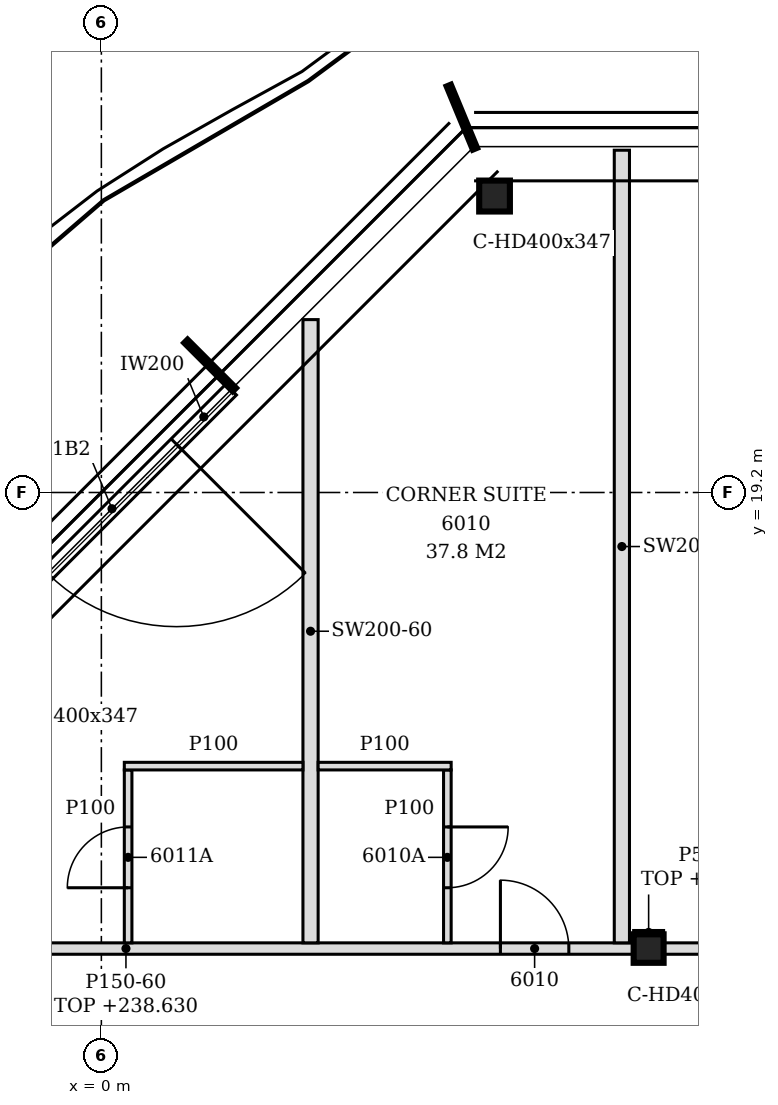
"""IFC4 building model, lengths in metres.
Left out: names, types, materials, properties, quantities, classifications, styles, units other than length and angle.
Written with IfcOpenShell. Run it as: python <this file> out.ifc"""

import sys

from ifc_helpers import new_model, si_unit, direction, frame, frame_2d, origin, origin_2d, place, context, subcontext, project, spatial, polyline, rectangle, i_section, outline, extrude, element, fill, save


model = new_model("IFC4")
c1 = context("Model", 3, precision=1e-05, world=origin(), true_north=direction((0.0, 1.0)))
c2 = subcontext(c1, "Body", "Model", "MODEL_VIEW")
j1 = project(units=[si_unit("LENGTHUNIT", "METRE"), si_unit("PLANEANGLEUNIT", "RADIAN")], contexts=[c1])
p1 = place(None, origin())
s1 = spatial("IfcSite", under=j1, at=p1, CompositionType="ELEMENT")
p2 = place(p1, origin())
s2 = spatial("IfcBuilding", under=s1, at=p2, CompositionType="ELEMENT")
p3 = place(p2, frame((0.0, 0.0, 235.8)))
s3 = spatial("IfcBuildingStorey", under=s2, at=p3, CompositionType="ELEMENT", Elevation=235.8)
p4 = place(p3, frame((5.173, 23.1, -0.15), z_axis=(0.0, 0.0, 1.0), x_axis=(1.0, 0.0, 0.0)))
e1 = element("IfcColumn", 1, at=p4, inside=s3, PredefinedType="COLUMN", context=c2, shape_type="SweptSolid", body=[
    extrude(i_section(OverallWidth=0.404, OverallDepth=0.407, WebThickness=0.027, FlangeThickness=0.044, FilletRadius=0.015, at=origin_2d()), origin(), (0.0, 0.0, 1.0), 3.6),
])
p5 = place(p3, frame((7.2, 13.2, -0.15), z_axis=(0.0, 0.0, 1.0), x_axis=(1.0, 0.0, 0.0)))
e2 = element("IfcColumn", 2, at=p5, inside=s3, PredefinedType="COLUMN", context=c2, shape_type="SweptSolid", body=[
    extrude(i_section(OverallWidth=0.394, OverallDepth=0.375, WebThickness=0.017, FlangeThickness=0.028, FilletRadius=0.015, at=origin_2d()), origin(), (0.0, 0.0, 1.0), 3.6),
])
p6 = place(p3, frame((1.707, 20.553, 0.0), z_axis=(0.0, 0.0, 1.0), x_axis=(-0.707106781187, -0.707106781187, 0.0)))
e3 = element("IfcWall", 3, at=p6, inside=s3, PredefinedType="NOTDEFINED", context=c2, shape_type="SweptSolid", body=[
    extrude(rectangle(XDim=4.431, YDim=0.2, at=frame_2d((2.216, 0.0))), origin(), (0.0, 0.0, 1.0), 3.45),
])
p7 = place(p6, frame((1.016, 0.0, 0.0)))
e4 = element("IfcOpeningElement", 4, at=p7, cuts=e3, PredefinedType="OPENING", context=c2, shape_type="SweptSolid", body=[
    extrude(rectangle(XDim=2.4, YDim=2.4, at=frame_2d((1.2, 1.2))), frame((0.0, 0.11, 0.0), z_axis=(0.0, -1.0, 0.0), x_axis=(1.0, 0.0, 0.0)), (0.0, 0.0, 1.0), 0.22),
])
p8 = place(p3, frame((-4.603, 13.2, 0.0), z_axis=(0.0, 0.0, 1.0), x_axis=(1.0, 0.0, 0.0)))
e5 = element("IfcWall", 5, at=p8, inside=s3, PredefinedType="PARTITIONING", context=c2, shape_type="SweptSolid", body=[
    extrude(outline(polyline([(0.0, 0.0), (11.606, 0.0), (11.606, 2.83), (0.446, 2.83), (0.444, 2.63), (0.0, 2.63), (0.0, 0.0)])), frame((0.0, 0.075, 0.0), z_axis=(0.0, -1.0, 0.0), x_axis=(1.0, 0.0, 0.0)), (0.0, 0.0, 1.0), 0.15),
])
p9 = place(p8, frame((9.853, 0.0, 0.0)))
e6 = element("IfcOpeningElement", 6, at=p9, cuts=e5, PredefinedType="OPENING", context=c2, shape_type="SweptSolid", body=[
    extrude(rectangle(XDim=0.9, YDim=2.1, at=frame_2d((0.45, 1.05))), frame((0.0, 0.085, 0.0), z_axis=(0.0, -1.0, 0.0), x_axis=(1.0, 0.0, 0.0)), (0.0, 0.0, 1.0), 0.17),
])
p10 = place(p3, frame((7.397, 13.2, 0.0), z_axis=(0.0, 0.0, 1.0), x_axis=(1.0, 0.0, 0.0)))
e7 = element("IfcWall", 7, at=p10, inside=s3, PredefinedType="PARTITIONING", context=c2, shape_type="SweptSolid", body=[
    extrude(rectangle(XDim=11.606, YDim=0.15, at=frame_2d((5.803, 0.0))), origin(), (0.0, 0.0, 1.0), 2.83),
])
p11 = place(p10, frame((3.227, 0.0, 0.0)))
e8 = element("IfcOpeningElement", 8, at=p11, cuts=e7, PredefinedType="OPENING", context=c2, shape_type="SweptSolid", body=[
    extrude(rectangle(XDim=1.8, YDim=2.1, at=frame_2d((0.9, 1.05))), frame((0.0, 0.085, 0.0), z_axis=(0.0, -1.0, 0.0), x_axis=(1.0, 0.0, 0.0)), (0.0, 0.0, 1.0), 0.17),
])
p12 = place(p3, frame((0.352, 13.275, 0.0), z_axis=(0.0, 0.0, 1.0), x_axis=(0.0, 1.0, 0.0)))
e9 = element("IfcWall", 9, at=p12, inside=s3, PredefinedType="PARTITIONING", context=c2, shape_type="SweptSolid", body=[
    extrude(outline(polyline([(0.0, 0.0), (2.275, 0.0), (2.275, 3.45), (0.075, 3.45), (0.073, 2.83), (0.0, 2.83), (0.0, 0.0)])), frame((0.0, 0.05, 0.0), z_axis=(0.0, -1.0, 0.0), x_axis=(1.0, 0.0, 0.0)), (0.0, 0.0, 1.0), 0.1),
])
p13 = place(p12, frame((0.725, 0.0, 0.0)))
e10 = element("IfcOpeningElement", 10, at=p13, cuts=e9, PredefinedType="OPENING", context=c2, shape_type="SweptSolid", body=[
    extrude(rectangle(XDim=0.8, YDim=2.1, at=frame_2d((0.4, 1.05))), frame((0.0, 0.06, 0.0), z_axis=(0.0, -1.0, 0.0), x_axis=(1.0, 0.0, 0.0)), (0.0, 0.0, 1.0), 0.12),
])
p14 = place(p3, frame((2.752, 13.275, 0.0), z_axis=(0.0, 0.0, 1.0), x_axis=(0.0, 1.0, 0.0)))
e11 = element("IfcWall", 11, at=p14, inside=s3, PredefinedType="PARTITIONING", context=c2, shape_type="SweptSolid", body=[
    extrude(outline(polyline([(0.0, 0.0), (8.199, 0.0), (8.199, 3.45), (7.716, 3.45), (7.714, 2.93), (7.092, 2.93), (7.09, 3.45), (6.01, 3.45), (6.008, 3.07), (5.84, 3.07), (5.838, 3.45), (0.075, 3.45), (0.073, 2.83), (0.0, 2.83), (0.0, 0.0)])), frame((0.0, 0.1, 0.0), z_axis=(0.0, -1.0, 0.0), x_axis=(1.0, 0.0, 0.0)), (0.0, 0.0, 1.0), 0.2),
])
p15 = place(p3, frame((4.552, 13.275, 0.0), z_axis=(0.0, 0.0, 1.0), x_axis=(0.0, 1.0, 0.0)))
e12 = element("IfcWall", 12, at=p15, inside=s3, PredefinedType="PARTITIONING", context=c2, shape_type="SweptSolid", body=[
    extrude(outline(polyline([(0.0, 0.0), (2.275, 0.0), (2.275, 3.45), (0.075, 3.45), (0.073, 2.83), (0.0, 2.83), (0.0, 0.0)])), frame((0.0, 0.05, 0.0), z_axis=(0.0, -1.0, 0.0), x_axis=(1.0, 0.0, 0.0)), (0.0, 0.0, 1.0), 0.1),
])
p16 = place(p15, frame((0.725, 0.0, 0.0)))
e13 = element("IfcOpeningElement", 13, at=p16, cuts=e12, PredefinedType="OPENING", context=c2, shape_type="SweptSolid", body=[
    extrude(rectangle(XDim=0.8, YDim=2.1, at=frame_2d((0.4, 1.05))), frame((0.0, 0.06, 0.0), z_axis=(0.0, -1.0, 0.0), x_axis=(1.0, 0.0, 0.0)), (0.0, 0.0, 1.0), 0.12),
])
p17 = place(p3, frame((6.848, 13.275, 0.0), z_axis=(0.0, 0.0, 1.0), x_axis=(0.0, 1.0, 0.0)))
e14 = element("IfcWall", 14, at=p17, inside=s3, PredefinedType="PARTITIONING", context=c2, shape_type="SweptSolid", body=[
    extrude(outline(polyline([(0.0, 0.0), (10.428, 0.0), (10.428, 3.45), (9.975, 3.45), (9.973, 2.93), (9.675, 2.93), (9.673, 3.45), (6.01, 3.45), (6.008, 3.07), (5.84, 3.07), (5.838, 3.45), (0.075, 3.45), (0.073, 2.83), (0.0, 2.83), (0.0, 0.0)])), frame((0.0, 0.1, 0.0), z_axis=(0.0, -1.0, 0.0), x_axis=(1.0, 0.0, 0.0)), (0.0, 0.0, 1.0), 0.2),
])
p18 = place(p3, frame((0.302, 15.6, 0.0), z_axis=(0.0, 0.0, 1.0), x_axis=(1.0, 0.0, 0.0)))
e15 = element("IfcWall", 15, at=p18, inside=s3, PredefinedType="PARTITIONING", context=c2, shape_type="SweptSolid", body=[
    extrude(rectangle(XDim=2.35, YDim=0.1, at=frame_2d((1.175, 0.0))), origin(), (0.0, 0.0, 1.0), 3.45),
])
p19 = place(p3, frame((2.852, 15.6, 0.0), z_axis=(0.0, 0.0, 1.0), x_axis=(1.0, 0.0, 0.0)))
e16 = element("IfcWall", 16, at=p19, inside=s3, PredefinedType="PARTITIONING", context=c2, shape_type="SweptSolid", body=[
    extrude(rectangle(XDim=1.75, YDim=0.1, at=frame_2d((0.875, 0.0))), origin(), (0.0, 0.0, 1.0), 3.45),
])
p20 = place(p3, frame((7.003, 13.413, 0.0), z_axis=(0.0, 0.0, 1.0), x_axis=(1.0, 0.0, 0.0)))
e17 = element("IfcWall", 17, at=p20, inside=s3, PredefinedType="PARTITIONING", context=c2, shape_type="SweptSolid", body=[
    extrude(rectangle(XDim=0.394, YDim=0.05, at=frame_2d((0.197, 0.0))), origin(), (0.0, 0.0, 1.0), 2.93),
])
p21 = place(p7, origin())
e18 = element("IfcDoor", 18, at=p21, inside=s3, OperationType="SINGLE_SWING_LEFT", PredefinedType="DOOR", context=c2, shape_type="SweptSolid", body=[
    extrude(rectangle(XDim=2.4, YDim=2.4, at=frame_2d((1.2, 1.2))), frame((0.0, 0.025, 0.0), z_axis=(0.0, -1.0, 0.0), x_axis=(1.0, 0.0, 0.0)), (0.0, 0.0, 1.0), 0.05),
])
fill(e4, e18)
p22 = place(p9, origin())
e19 = element("IfcDoor", 19, at=p22, inside=s3, OperationType="SINGLE_SWING_LEFT", PredefinedType="DOOR", context=c2, shape_type="SweptSolid", body=[
    extrude(rectangle(XDim=0.9, YDim=2.1, at=frame_2d((0.45, 1.05))), frame((0.0, 0.025, 0.0), z_axis=(0.0, -1.0, 0.0), x_axis=(1.0, 0.0, 0.0)), (0.0, 0.0, 1.0), 0.05),
])
fill(e6, e19)
p23 = place(p16, frame((0.8, 0.0, 0.0), z_axis=(0.0, 0.0, 1.0), x_axis=(-1.0, 0.0, 0.0)))
e20 = element("IfcDoor", 20, at=p23, inside=s3, OperationType="SINGLE_SWING_LEFT", PredefinedType="DOOR", context=c2, shape_type="SweptSolid", body=[
    extrude(rectangle(XDim=0.8, YDim=2.1, at=frame_2d((0.4, 1.05))), frame((0.0, 0.025, 0.0), z_axis=(0.0, -1.0, 0.0), x_axis=(1.0, 0.0, 0.0)), (0.0, 0.0, 1.0), 0.05),
])
fill(e13, e20)
p24 = place(p13, origin())
e21 = element("IfcDoor", 21, at=p24, inside=s3, OperationType="SINGLE_SWING_LEFT", PredefinedType="DOOR", context=c2, shape_type="SweptSolid", body=[
    extrude(rectangle(XDim=0.8, YDim=2.1, at=frame_2d((0.4, 1.05))), frame((0.0, 0.025, 0.0), z_axis=(0.0, -1.0, 0.0), x_axis=(1.0, 0.0, 0.0)), (0.0, 0.0, 1.0), 0.05),
])
fill(e10, e21)
save(model, sys.argv[1])
